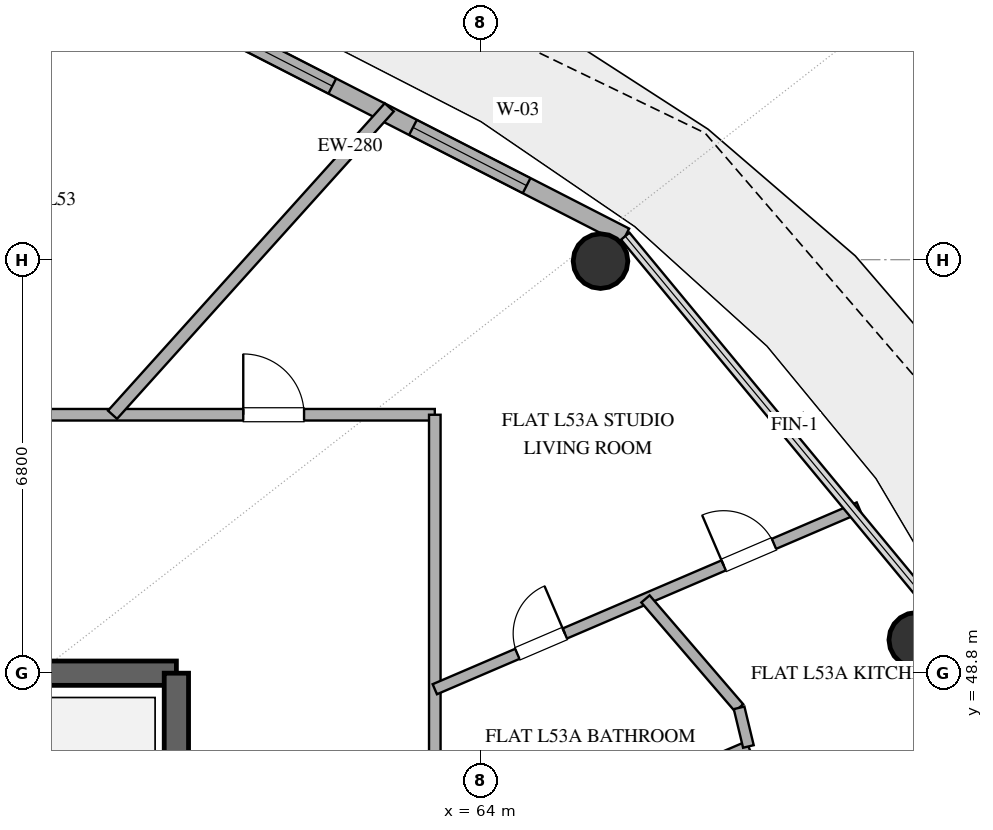
"""IFC4 building model, lengths in metres.
Left out: names, types, materials, properties, quantities, classifications, styles, units other than length and angle.
Written with IfcOpenShell. Run it as: python <this file> out.ifc"""

import sys

from ifc_helpers import new_model, si_unit, direction, frame, frame_2d, origin, origin_2d, place, context, subcontext, project, spatial, rectangle, hollow_circle, extrude, element, fill, save


model = new_model("IFC4")
c1 = context("Model", 3, precision=1e-05, world=origin(), true_north=direction((0.0, 1.0)))
c2 = subcontext(c1, "Body", "Model", "MODEL_VIEW")
j1 = project(units=[si_unit("LENGTHUNIT", "METRE"), si_unit("PLANEANGLEUNIT", "RADIAN")], contexts=[c1])
p1 = place(None, origin())
s1 = spatial("IfcSite", under=j1, at=p1, CompositionType="ELEMENT")
p2 = place(p1, origin())
s2 = spatial("IfcBuilding", under=s1, at=p2, CompositionType="ELEMENT")
p3 = place(p2, frame((0.0, 0.0, 210.0)))
s3 = spatial("IfcBuildingStorey", under=s2, at=p3, CompositionType="ELEMENT", Elevation=210.0)
p4 = place(p3, frame((55.0, 48.8, 0.0), z_axis=(0.0, 0.0, 1.0), x_axis=(1.0, 0.0, 0.0)))
e1 = element("IfcWall", 1, at=p4, inside=s3, PredefinedType="SHEAR", context=c2, shape_type="SweptSolid", body=[
    extrude(rectangle(XDim=4.0, YDim=0.4, at=frame_2d((2.0, 0.0))), origin(), (0.0, 0.0, 1.0), 3.36),
])
p5 = place(p3, frame((59.0, 35.2, 0.0), z_axis=(0.0, 0.0, 1.0), x_axis=(0.0, 1.0, 0.0)))
e2 = element("IfcWall", 2, at=p5, inside=s3, PredefinedType="SHEAR", context=c2, shape_type="SweptSolid", body=[
    extrude(rectangle(XDim=13.6, YDim=0.4, at=frame_2d((6.8, 0.0))), origin(), (0.0, 0.0, 1.0), 3.36),
])
for number, where, z_axis, x_axis in (
    (3, (71.169, 49.347, 0.0), (0.0, 0.0, 1.0), (1.0, 0.0, 0.0)),
    (4, (65.975, 55.576, 0.0), (0.0, 0.0, 1.0), (1.0, 0.0, 0.0)),
):
    element("IfcColumn", number, at=place(p3, frame(where, z_axis=z_axis, x_axis=x_axis)), inside=s3, PredefinedType="COLUMN", context=c2, shape_type="SweptSolid", body=[
        extrude(hollow_circle(Radius=0.45, WallThickness=0.025, at=origin_2d()), origin(), (0.0, 0.0, 1.0), 3.36),
    ])
p6 = place(p3, frame((66.383, 55.987, 0.0), z_axis=(0.0, 0.0, 1.0), x_axis=(-0.890007394051, 0.455946091699, 0.0)))
e5 = element("IfcWall", 5, at=p6, inside=s3, PredefinedType="SOLIDWALL", context=c2, shape_type="SweptSolid", body=[
    extrude(rectangle(XDim=9.404, YDim=0.28, at=frame_2d((4.702, 0.0))), origin(), (0.0, 0.0, 1.0), 3.36),
])
p7 = place(p6, frame((1.823, 0.0, 0.85)))
e6 = element("IfcOpeningElement", 6, at=p7, cuts=e5, PredefinedType="OPENING", context=c2, shape_type="SweptSolid", body=[
    extrude(rectangle(XDim=2.1, YDim=2.2, at=frame_2d((1.05, 1.1))), frame((0.0, 0.15, 0.0), z_axis=(0.0, -1.0, 0.0), x_axis=(1.0, 0.0, 0.0)), (0.0, 0.0, 1.0), 0.3),
])
p8 = place(p6, frame((5.414, 0.0, 0.85)))
e7 = element("IfcOpeningElement", 7, at=p8, cuts=e5, PredefinedType="OPENING", context=c2, shape_type="SweptSolid", body=[
    extrude(rectangle(XDim=1.8, YDim=2.2, at=frame_2d((0.9, 1.1))), frame((0.0, 0.15, 0.0), z_axis=(0.0, -1.0, 0.0), x_axis=(1.0, 0.0, 0.0)), (0.0, 0.0, 1.0), 0.3),
])
p9 = place(p3, frame((45.931, 53.05, 0.0), z_axis=(0.0, 0.0, 1.0), x_axis=(1.0, 0.0, 0.0)))
e8 = element("IfcWall", 8, at=p9, inside=s3, PredefinedType="PARTITIONING", context=c2, shape_type="SweptSolid", body=[
    extrude(rectangle(XDim=17.319, YDim=0.19, at=frame_2d((8.659, 0.0))), origin(), (0.0, 0.0, 1.0), 2.72),
])
p10 = place(p9, frame((6.935, 0.0, 0.0)))
e9 = element("IfcOpeningElement", 9, at=p10, cuts=e8, PredefinedType="OPENING", context=c2, shape_type="SweptSolid", body=[
    extrude(rectangle(XDim=1.0, YDim=2.2, at=frame_2d((0.5, 1.1))), frame((0.0, 0.105, 0.0), z_axis=(0.0, -1.0, 0.0), x_axis=(1.0, 0.0, 0.0)), (0.0, 0.0, 1.0), 0.21),
])
p11 = place(p9, frame((14.168, 0.0, 0.0)))
e10 = element("IfcOpeningElement", 10, at=p11, cuts=e8, PredefinedType="OPENING", context=c2, shape_type="SweptSolid", body=[
    extrude(rectangle(XDim=1.0, YDim=2.2, at=frame_2d((0.5, 1.1))), frame((0.0, 0.105, 0.0), z_axis=(0.0, -1.0, 0.0), x_axis=(1.0, 0.0, 0.0)), (0.0, 0.0, 1.0), 0.21),
])
p12 = place(p3, frame((57.949, 53.05, 0.0), z_axis=(0.0, 0.0, 1.0), x_axis=(0.66913524162, 0.743140651844, 0.0)))
e11 = element("IfcWall", 11, at=p12, inside=s3, PredefinedType="PARTITIONING", context=c2, shape_type="SweptSolid", body=[
    extrude(rectangle(XDim=6.802, YDim=0.2, at=frame_2d((3.401, 0.0))), origin(), (0.0, 0.0, 1.0), 2.72),
])
p13 = place(p3, frame((68.407, 47.595, 0.0), z_axis=(0.0, 0.0, 1.0), x_axis=(-0.919138278408, -0.393935051963, 0.0)))
e12 = element("IfcWall", 12, at=p13, inside=s3, PredefinedType="PLUMBINGWALL", context=c2, shape_type="SweptSolid", body=[
    extrude(rectangle(XDim=5.611, YDim=0.18, at=frame_2d((2.806, 0.0))), origin(), (0.0, 0.0, 1.0), 2.72),
])
p14 = place(p3, frame((63.25, 45.35, 0.0), z_axis=(0.0, 0.0, 1.0), x_axis=(0.0, 1.0, 0.0)))
e13 = element("IfcWall", 13, at=p14, inside=s3, PredefinedType="PARTITIONING", context=c2, shape_type="SweptSolid", body=[
    extrude(rectangle(XDim=7.7, YDim=0.19, at=frame_2d((3.85, 0.0))), origin(), (0.0, 0.0, 1.0), 2.72),
])
p15 = place(p3, frame((63.25, 48.536, 0.0), z_axis=(0.0, 0.0, 1.0), x_axis=(0.919133380172, 0.393946480443, 0.0)))
e14 = element("IfcWall", 14, at=p15, inside=s3, PredefinedType="PLUMBINGWALL", context=c2, shape_type="SweptSolid", body=[
    extrude(rectangle(XDim=7.588, YDim=0.18, at=frame_2d((3.794, 0.0))), origin(), (0.0, 0.0, 1.0), 2.72),
])
p16 = place(p15, frame((5.169, 0.0, 0.0)))
e15 = element("IfcOpeningElement", 15, at=p16, cuts=e14, PredefinedType="OPENING", context=c2, shape_type="SweptSolid", body=[
    extrude(rectangle(XDim=0.9, YDim=2.1, at=frame_2d((0.45, 1.05))), frame((0.0, 0.1, 0.0), z_axis=(0.0, -1.0, 0.0), x_axis=(1.0, 0.0, 0.0)), (0.0, 0.0, 1.0), 0.2),
])
p17 = place(p15, frame((1.477, 0.0, 0.0)))
e16 = element("IfcOpeningElement", 16, at=p17, cuts=e14, PredefinedType="OPENING", context=c2, shape_type="SweptSolid", body=[
    extrude(rectangle(XDim=0.85, YDim=2.1, at=frame_2d((0.425, 1.05))), frame((0.0, 0.1, 0.0), z_axis=(0.0, -1.0, 0.0), x_axis=(1.0, 0.0, 0.0)), (0.0, 0.0, 1.0), 0.2),
])
p18 = place(p3, frame((66.715, 50.021, 0.0), z_axis=(0.0, 0.0, 1.0), x_axis=(0.651871704999, -0.758329268999, 0.0)))
e17 = element("IfcWall", 17, at=p18, inside=s3, PredefinedType="PLUMBINGWALL", context=c2, shape_type="SweptSolid", body=[
    extrude(rectangle(XDim=2.362, YDim=0.18, at=frame_2d((1.181, 0.0))), origin(), (0.0, 0.0, 1.0), 2.72),
])
p19 = place(p3, frame((68.255, 48.23, 0.0), z_axis=(0.0, 0.0, 1.0), x_axis=(0.233909944351, -0.972258267095, 0.0)))
e18 = element("IfcWall", 18, at=p19, inside=s3, PredefinedType="PLUMBINGWALL", context=c2, shape_type="SweptSolid", body=[
    extrude(rectangle(XDim=0.653, YDim=0.18, at=frame_2d((0.327, 0.0))), origin(), (0.0, 0.0, 1.0), 2.72),
])
p20 = place(p7, origin())
e19 = element("IfcWindow", 19, at=p20, inside=s3, PartitioningType="SINGLE_PANEL", PredefinedType="WINDOW", context=c2, shape_type="SweptSolid", body=[
    extrude(rectangle(XDim=2.1, YDim=2.2, at=frame_2d((1.05, 1.1))), frame((0.0, 0.03, 0.0), z_axis=(0.0, -1.0, 0.0), x_axis=(1.0, 0.0, 0.0)), (0.0, 0.0, 1.0), 0.06),
])
fill(e6, e19)
p21 = place(p8, origin())
e20 = element("IfcWindow", 20, at=p21, inside=s3, PartitioningType="SINGLE_PANEL", PredefinedType="WINDOW", context=c2, shape_type="SweptSolid", body=[
    extrude(rectangle(XDim=1.8, YDim=2.2, at=frame_2d((0.9, 1.1))), frame((0.0, 0.03, 0.0), z_axis=(0.0, -1.0, 0.0), x_axis=(1.0, 0.0, 0.0)), (0.0, 0.0, 1.0), 0.06),
])
fill(e7, e20)
p22 = place(p11, origin())
e21 = element("IfcDoor", 21, at=p22, inside=s3, OperationType="SINGLE_SWING_LEFT", PredefinedType="DOOR", context=c2, shape_type="SweptSolid", body=[
    extrude(rectangle(XDim=1.0, YDim=2.2, at=frame_2d((0.5, 1.1))), frame((0.0, 0.025, 0.0), z_axis=(0.0, -1.0, 0.0), x_axis=(1.0, 0.0, 0.0)), (0.0, 0.0, 1.0), 0.05),
])
fill(e10, e21)
p23 = place(p16, origin())
e22 = element("IfcDoor", 22, at=p23, inside=s3, OperationType="SINGLE_SWING_LEFT", PredefinedType="DOOR", context=c2, shape_type="SweptSolid", body=[
    extrude(rectangle(XDim=0.9, YDim=2.1, at=frame_2d((0.45, 1.05))), frame((0.0, 0.025, 0.0), z_axis=(0.0, -1.0, 0.0), x_axis=(1.0, 0.0, 0.0)), (0.0, 0.0, 1.0), 0.05),
])
fill(e15, e22)
p24 = place(p17, origin())
e23 = element("IfcDoor", 23, at=p24, inside=s3, OperationType="SINGLE_SWING_RIGHT", PredefinedType="DOOR", context=c2, shape_type="SweptSolid", body=[
    extrude(rectangle(XDim=0.85, YDim=2.1, at=frame_2d((0.425, 1.05))), frame((0.0, 0.025, 0.0), z_axis=(0.0, -1.0, 0.0), x_axis=(1.0, 0.0, 0.0)), (0.0, 0.0, 1.0), 0.05),
])
fill(e16, e23)
save(model, sys.argv[1])
